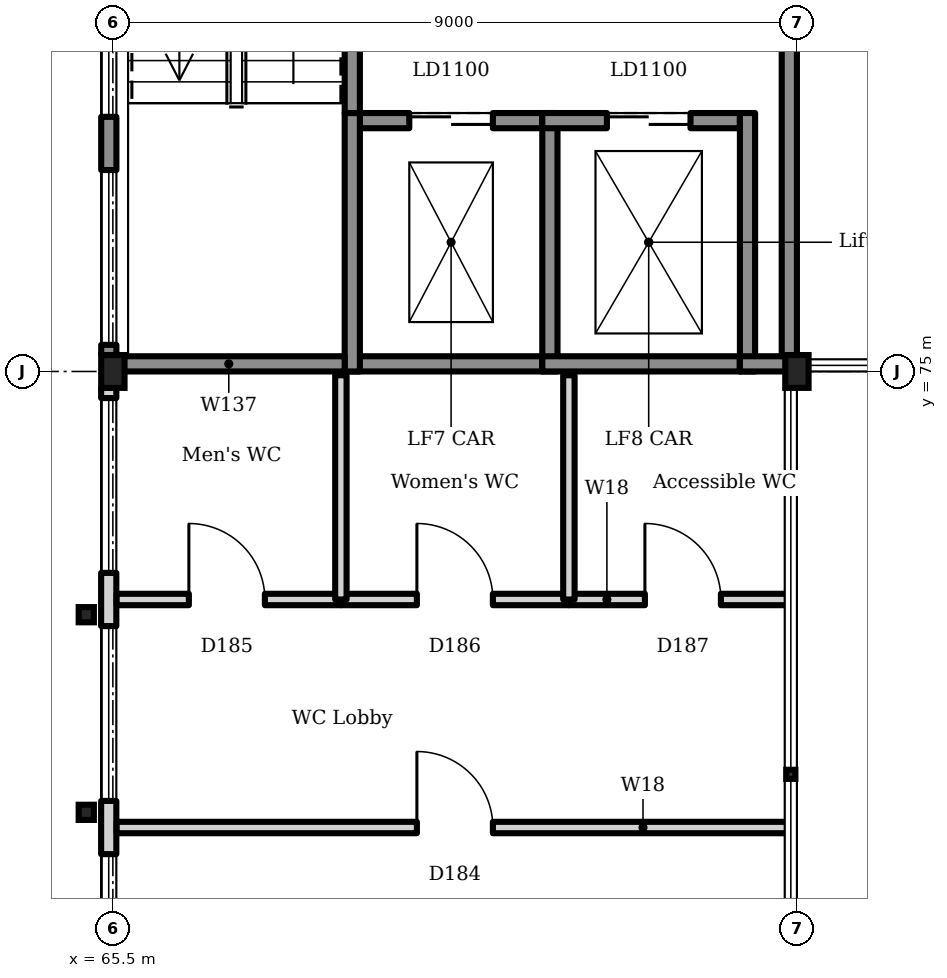
"""IFC4 building model, lengths in metres.
Left out: names, types, materials, properties, quantities, classifications, styles, units other than length and angle.
Written with IfcOpenShell. Run it as: python <this file> out.ifc"""

import sys

from ifc_helpers import new_model, si_unit, direction, frame, frame_2d, origin, origin_2d, place, context, subcontext, project, spatial, rectangle, hollow_rectangle, i_section, extrude, element, fill, save


model = new_model("IFC4")
c1 = context("Model", 3, precision=1e-05, world=origin(), true_north=direction((0.0, 1.0)))
c2 = subcontext(c1, "Body", "Model", "MODEL_VIEW")
j1 = project(units=[si_unit("LENGTHUNIT", "METRE"), si_unit("PLANEANGLEUNIT", "RADIAN")], contexts=[c1])
p1 = place(None, origin())
s1 = spatial("IfcSite", under=j1, at=p1, CompositionType="ELEMENT")
p2 = place(p1, origin())
s2 = spatial("IfcBuilding", under=s1, at=p2, CompositionType="ELEMENT")
p3 = place(p2, origin())
s3 = spatial("IfcBuildingStorey", under=s2, at=p3, CompositionType="ELEMENT", Elevation=0.0)
p4 = place(p3, frame((68.75, 78.3, -1.1), z_axis=(0.0, 0.0, 1.0), x_axis=(1.0, 0.0, 0.0)))
e1 = element("IfcWall", 1, at=p4, inside=s3, PredefinedType="SOLIDWALL", context=c2, shape_type="SweptSolid", body=[
    extrude(rectangle(XDim=2.4, YDim=0.2, at=frame_2d((1.2, 0.0))), origin(), (0.0, 0.0, 1.0), 6.5),
])
p5 = place(p4, frame((0.65, 0.0, 1.1)))
e2 = element("IfcOpeningElement", 2, at=p5, cuts=e1, PredefinedType="OPENING", context=c2, shape_type="SweptSolid", body=[
    extrude(rectangle(XDim=1.1, YDim=2.1, at=frame_2d((0.55, 1.05))), frame((0.0, 0.11, 0.0), z_axis=(0.0, -1.0, 0.0), x_axis=(1.0, 0.0, 0.0)), (0.0, 0.0, 1.0), 0.22),
])
p6 = place(p3, frame((68.55, 75.1, -1.1), z_axis=(0.0, 0.0, 1.0), x_axis=(1.0, 0.0, 0.0)))
e3 = element("IfcWall", 3, at=p6, inside=s3, PredefinedType="SOLIDWALL", context=c2, shape_type="SweptSolid", body=[
    extrude(rectangle(XDim=2.6, YDim=0.2, at=frame_2d((1.3, 0.0))), origin(), (0.0, 0.0, 1.0), 6.5),
])
for number, where, z_axis, x_axis in (
    (4, (68.65, 75.0, -1.1), (0.0, 0.0, 1.0), (0.0, 1.0, 0.0)),
    (5, (71.25, 75.0, -1.1), (0.0, 0.0, 1.0), (0.0, 1.0, 0.0)),
):
    element("IfcWall", number, at=place(p3, frame(where, z_axis=z_axis, x_axis=x_axis)), inside=s3, PredefinedType="SOLIDWALL", context=c2, shape_type="SweptSolid", body=[
        extrude(rectangle(XDim=3.4, YDim=0.2, at=frame_2d((1.7, 0.0))), origin(), (0.0, 0.0, 1.0), 6.5),
    ])
p7 = place(p3, frame((71.15, 78.3, -1.1), z_axis=(0.0, 0.0, 1.0), x_axis=(1.0, 0.0, 0.0)))
e6 = element("IfcWall", 6, at=p7, inside=s3, PredefinedType="SOLIDWALL", context=c2, shape_type="SweptSolid", body=[
    extrude(rectangle(XDim=2.6, YDim=0.2, at=frame_2d((1.3, 0.0))), origin(), (0.0, 0.0, 1.0), 6.5),
])
p8 = place(p7, frame((0.85, 0.0, 1.1)))
e7 = element("IfcOpeningElement", 7, at=p8, cuts=e6, PredefinedType="OPENING", context=c2, shape_type="SweptSolid", body=[
    extrude(rectangle(XDim=1.1, YDim=2.1, at=frame_2d((0.55, 1.05))), frame((0.0, 0.11, 0.0), z_axis=(0.0, -1.0, 0.0), x_axis=(1.0, 0.0, 0.0)), (0.0, 0.0, 1.0), 0.22),
])
p9 = place(p3, frame((71.15, 75.1, -1.1), z_axis=(0.0, 0.0, 1.0), x_axis=(1.0, 0.0, 0.0)))
e8 = element("IfcWall", 8, at=p9, inside=s3, PredefinedType="SOLIDWALL", context=c2, shape_type="SweptSolid", body=[
    extrude(rectangle(XDim=2.6, YDim=0.2, at=frame_2d((1.3, 0.0))), origin(), (0.0, 0.0, 1.0), 6.5),
])
p10 = place(p3, frame((73.85, 75.0, -1.1), z_axis=(0.0, 0.0, 1.0), x_axis=(0.0, 1.0, 0.0)))
e9 = element("IfcWall", 9, at=p10, inside=s3, PredefinedType="SOLIDWALL", context=c2, shape_type="SweptSolid", body=[
    extrude(rectangle(XDim=3.4, YDim=0.2, at=frame_2d((1.7, 0.0))), origin(), (0.0, 0.0, 1.0), 6.5),
])
for number, where, z_axis, x_axis in (
    (10, (65.5, 75.0, 0.0), (0.0, 0.0, 1.0), (1.0, 0.0, 0.0)),
    (11, (74.5, 75.0, 0.0), (0.0, 0.0, 1.0), (1.0, 0.0, 0.0)),
):
    element("IfcColumn", number, at=place(p3, frame(where, z_axis=z_axis, x_axis=x_axis)), inside=s3, PredefinedType="COLUMN", context=c2, shape_type="SweptSolid", body=[
        extrude(i_section(OverallWidth=0.307, OverallDepth=0.432, WebThickness=0.021, FlangeThickness=0.04, FilletRadius=0.027, at=origin_2d()), origin(), (0.0, 0.0, 1.0), 5.4),
    ])
p11 = place(p3, frame((65.446, 66.188, 0.0), z_axis=(0.0, 0.0, 1.0), x_axis=(0.0, 1.0, 0.0)))
e12 = element("IfcWall", 12, at=p11, inside=s3, PredefinedType="SOLIDWALL", context=c2, shape_type="SweptSolid", body=[
    extrude(rectangle(XDim=8.595, YDim=0.2, at=frame_2d((4.298, 0.0))), origin(), (0.0, 0.0, 1.0), 4.65),
])
p12 = place(p11, frame((0.162, 0.0, 0.9)))
e13 = element("IfcOpeningElement", 13, at=p12, cuts=e12, PredefinedType="OPENING", context=c2, shape_type="SweptSolid", body=[
    extrude(rectangle(XDim=2.3, YDim=3.6, at=frame_2d((1.15, 1.8))), frame((0.0, 0.11, 0.0), z_axis=(0.0, -1.0, 0.0), x_axis=(1.0, 0.0, 0.0)), (0.0, 0.0, 1.0), 0.22),
])
p13 = place(p11, frame((3.162, 0.0, 0.9)))
e14 = element("IfcOpeningElement", 14, at=p13, cuts=e12, PredefinedType="OPENING", context=c2, shape_type="SweptSolid", body=[
    extrude(rectangle(XDim=2.3, YDim=3.6, at=frame_2d((1.15, 1.8))), frame((0.0, 0.11, 0.0), z_axis=(0.0, -1.0, 0.0), x_axis=(1.0, 0.0, 0.0)), (0.0, 0.0, 1.0), 0.22),
])
p14 = place(p11, frame((6.162, 0.0, 0.9)))
e15 = element("IfcOpeningElement", 15, at=p14, cuts=e12, PredefinedType="OPENING", context=c2, shape_type="SweptSolid", body=[
    extrude(rectangle(XDim=2.3, YDim=3.6, at=frame_2d((1.15, 1.8))), frame((0.0, 0.11, 0.0), z_axis=(0.0, -1.0, 0.0), x_axis=(1.0, 0.0, 0.0)), (0.0, 0.0, 1.0), 0.22),
])
p15 = place(p3, frame((65.447, 75.216, 0.0), z_axis=(0.0, 0.0, 1.0), x_axis=(0.0, 1.0, 0.0)))
e16 = element("IfcWall", 16, at=p15, inside=s3, PredefinedType="SOLIDWALL", context=c2, shape_type="SweptSolid", body=[
    extrude(rectangle(XDim=8.418, YDim=0.2, at=frame_2d((4.209, 0.0))), origin(), (0.0, 0.0, 1.0), 5.2),
])
p16 = place(p15, frame((7.184, 0.0, 0.0)))
e17 = element("IfcOpeningElement", 17, at=p16, cuts=e16, PredefinedType="OPENING", context=c2, shape_type="SweptSolid", body=[
    extrude(rectangle(XDim=1.0, YDim=2.1, at=frame_2d((0.5, 1.05))), frame((0.0, 0.11, 0.0), z_axis=(0.0, -1.0, 0.0), x_axis=(1.0, 0.0, 0.0)), (0.0, 0.0, 1.0), 0.22),
])
p17 = place(p15, frame((0.134, 0.0, 0.9)))
e18 = element("IfcOpeningElement", 18, at=p17, cuts=e16, PredefinedType="OPENING", context=c2, shape_type="SweptSolid", body=[
    extrude(rectangle(XDim=2.3, YDim=3.6, at=frame_2d((1.15, 1.8))), frame((0.0, 0.11, 0.0), z_axis=(0.0, -1.0, 0.0), x_axis=(1.0, 0.0, 0.0)), (0.0, 0.0, 1.0), 0.22),
])
p18 = place(p15, frame((3.134, 0.0, 0.9)))
e19 = element("IfcOpeningElement", 19, at=p18, cuts=e16, PredefinedType="OPENING", context=c2, shape_type="SweptSolid", body=[
    extrude(rectangle(XDim=2.3, YDim=3.6, at=frame_2d((1.15, 1.8))), frame((0.0, 0.11, 0.0), z_axis=(0.0, -1.0, 0.0), x_axis=(1.0, 0.0, 0.0)), (0.0, 0.0, 1.0), 0.22),
])
p19 = place(p3, frame((65.5, 75.1, 0.0), z_axis=(0.0, 0.0, 1.0), x_axis=(1.0, 0.0, 0.0)))
e20 = element("IfcWall", 20, at=p19, inside=s3, PredefinedType="SHEAR", context=c2, shape_type="SweptSolid", body=[
    extrude(rectangle(XDim=3.05, YDim=0.2, at=frame_2d((1.525, 0.0))), origin(), (0.0, 0.0, 1.0), 5.2),
])
p20 = place(p3, frame((73.75, 75.1, 0.0), z_axis=(0.0, 0.0, 1.0), x_axis=(1.0, 0.0, 0.0)))
e21 = element("IfcWall", 21, at=p20, inside=s3, PredefinedType="SHEAR", context=c2, shape_type="SweptSolid", body=[
    extrude(rectangle(XDim=0.75, YDim=0.2, at=frame_2d((0.375, 0.0))), origin(), (0.0, 0.0, 1.0), 4.65),
])
p21 = place(p3, frame((74.4, 75.2, 0.0), z_axis=(0.0, 0.0, 1.0), x_axis=(0.0, 1.0, 0.0)))
e22 = element("IfcWall", 22, at=p21, inside=s3, PredefinedType="SHEAR", context=c2, shape_type="SweptSolid", body=[
    extrude(rectangle(XDim=8.6, YDim=0.2, at=frame_2d((4.3, 0.0))), origin(), (0.0, 0.0, 1.0), 4.65),
])
p22 = place(p21, frame((4.9, 0.0, 0.0)))
e23 = element("IfcOpeningElement", 23, at=p22, cuts=e22, PredefinedType="OPENING", context=c2, shape_type="SweptSolid", body=[
    extrude(rectangle(XDim=1.8, YDim=2.1, at=frame_2d((0.9, 1.05))), frame((0.0, 0.11, 0.0), z_axis=(0.0, -1.0, 0.0), x_axis=(1.0, 0.0, 0.0)), (0.0, 0.0, 1.0), 0.22),
])
p23 = place(p3, frame((68.65, 78.4, 0.0), z_axis=(0.0, 0.0, 1.0), x_axis=(0.0, 1.0, 0.0)))
e24 = element("IfcWall", 24, at=p23, inside=s3, PredefinedType="SHEAR", context=c2, shape_type="SweptSolid", body=[
    extrude(rectangle(XDim=5.4, YDim=0.2, at=frame_2d((2.7, 0.0))), origin(), (0.0, 0.0, 1.0), 5.2),
])
p24 = place(p23, frame((4.1, 0.0, 0.0)))
e25 = element("IfcOpeningElement", 25, at=p24, cuts=e24, PredefinedType="OPENING", context=c2, shape_type="SweptSolid", body=[
    extrude(rectangle(XDim=1.0, YDim=2.1, at=frame_2d((0.5, 1.05))), frame((0.0, 0.11, 0.0), z_axis=(0.0, -1.0, 0.0), x_axis=(1.0, 0.0, 0.0)), (0.0, 0.0, 1.0), 0.22),
])
p25 = place(p3, frame((65.55, 69.0, 0.0), z_axis=(0.0, 0.0, 1.0), x_axis=(1.0, 0.0, 0.0)))
e26 = element("IfcWall", 26, at=p25, inside=s3, PredefinedType="PARTITIONING", context=c2, shape_type="SweptSolid", body=[
    extrude(rectangle(XDim=8.9, YDim=0.15, at=frame_2d((4.45, 0.0))), origin(), (0.0, 0.0, 1.0), 4.6),
])
p26 = place(p25, frame((3.95, 0.0, 0.0)))
e27 = element("IfcOpeningElement", 27, at=p26, cuts=e26, PredefinedType="OPENING", context=c2, shape_type="SweptSolid", body=[
    extrude(rectangle(XDim=1.0, YDim=2.1, at=frame_2d((0.5, 1.05))), frame((0.0, 0.085, 0.0), z_axis=(0.0, -1.0, 0.0), x_axis=(1.0, 0.0, 0.0)), (0.0, 0.0, 1.0), 0.17),
])
p27 = place(p3, frame((71.5, 72.0, 0.0), z_axis=(0.0, 0.0, 1.0), x_axis=(1.0, 0.0, 0.0)))
e28 = element("IfcWall", 28, at=p27, inside=s3, PredefinedType="PARTITIONING", context=c2, shape_type="SweptSolid", body=[
    extrude(rectangle(XDim=2.95, YDim=0.15, at=frame_2d((1.475, 0.0))), origin(), (0.0, 0.0, 1.0), 4.6),
])
p28 = place(p27, frame((1.0, 0.0, 0.0)))
e29 = element("IfcOpeningElement", 29, at=p28, cuts=e28, PredefinedType="OPENING", context=c2, shape_type="SweptSolid", body=[
    extrude(rectangle(XDim=1.0, YDim=2.1, at=frame_2d((0.5, 1.05))), frame((0.0, 0.085, 0.0), z_axis=(0.0, -1.0, 0.0), x_axis=(1.0, 0.0, 0.0)), (0.0, 0.0, 1.0), 0.17),
])
p29 = place(p3, frame((68.5, 72.0, 0.0), z_axis=(0.0, 0.0, 1.0), x_axis=(1.0, 0.0, 0.0)))
e30 = element("IfcWall", 30, at=p29, inside=s3, PredefinedType="PARTITIONING", context=c2, shape_type="SweptSolid", body=[
    extrude(rectangle(XDim=3.0, YDim=0.15, at=frame_2d((1.5, 0.0))), origin(), (0.0, 0.0, 1.0), 4.6),
])
p30 = place(p29, frame((1.0, 0.0, 0.0)))
e31 = element("IfcOpeningElement", 31, at=p30, cuts=e30, PredefinedType="OPENING", context=c2, shape_type="SweptSolid", body=[
    extrude(rectangle(XDim=1.0, YDim=2.1, at=frame_2d((0.5, 1.05))), frame((0.0, 0.085, 0.0), z_axis=(0.0, -1.0, 0.0), x_axis=(1.0, 0.0, 0.0)), (0.0, 0.0, 1.0), 0.17),
])
p31 = place(p3, frame((65.55, 72.0, 0.0), z_axis=(0.0, 0.0, 1.0), x_axis=(1.0, 0.0, 0.0)))
e32 = element("IfcWall", 32, at=p31, inside=s3, PredefinedType="PARTITIONING", context=c2, shape_type="SweptSolid", body=[
    extrude(rectangle(XDim=2.95, YDim=0.15, at=frame_2d((1.475, 0.0))), origin(), (0.0, 0.0, 1.0), 4.6),
])
p32 = place(p31, frame((0.95, 0.0, 0.0)))
e33 = element("IfcOpeningElement", 33, at=p32, cuts=e32, PredefinedType="OPENING", context=c2, shape_type="SweptSolid", body=[
    extrude(rectangle(XDim=1.0, YDim=2.1, at=frame_2d((0.5, 1.05))), frame((0.0, 0.085, 0.0), z_axis=(0.0, -1.0, 0.0), x_axis=(1.0, 0.0, 0.0)), (0.0, 0.0, 1.0), 0.17),
])
for number, where, z_axis, x_axis in (
    (34, (68.5, 72.0, 0.0), (0.0, 0.0, 1.0), (0.0, 1.0, 0.0)),
    (35, (71.5, 72.0, 0.0), (0.0, 0.0, 1.0), (0.0, 1.0, 0.0)),
):
    element("IfcWall", number, at=place(p3, frame(where, z_axis=z_axis, x_axis=x_axis)), inside=s3, PredefinedType="PARTITIONING", context=c2, shape_type="SweptSolid", body=[
        extrude(rectangle(XDim=2.95, YDim=0.15, at=frame_2d((1.475, 0.0))), origin(), (0.0, 0.0, 1.0), 4.6),
    ])
for number, where, z_axis, x_axis in (
    (36, (65.15, 69.2, 0.0), (0.0, 0.0, 1.0), (1.0, 0.0, 0.0)),
    (37, (65.15, 71.8, 0.0), (0.0, 0.0, 1.0), (1.0, 0.0, 0.0)),
):
    element("IfcColumn", number, at=place(p3, frame(where, z_axis=z_axis, x_axis=x_axis)), inside=s3, PredefinedType="COLUMN", context=c2, shape_type="SweptSolid", body=[
        extrude(hollow_rectangle(XDim=0.2, YDim=0.2, WallThickness=0.01, InnerFilletRadius=0.01, OuterFilletRadius=0.015, at=origin_2d()), origin(), (0.0, 0.0, 1.0), 5.4),
    ])
p33 = place(p5, origin())
e38 = element("IfcDoor", 38, at=p33, inside=s3, OperationType="SLIDING_TO_LEFT", PredefinedType="DOOR", context=c2, shape_type="SweptSolid", body=[
    extrude(rectangle(XDim=1.1, YDim=2.1, at=frame_2d((0.55, 1.05))), frame((0.0, 0.025, 0.0), z_axis=(0.0, -1.0, 0.0), x_axis=(1.0, 0.0, 0.0)), (0.0, 0.0, 1.0), 0.05),
])
fill(e2, e38)
p34 = place(p8, origin())
e39 = element("IfcDoor", 39, at=p34, inside=s3, OperationType="SLIDING_TO_LEFT", PredefinedType="DOOR", context=c2, shape_type="SweptSolid", body=[
    extrude(rectangle(XDim=1.1, YDim=2.1, at=frame_2d((0.55, 1.05))), frame((0.0, 0.025, 0.0), z_axis=(0.0, -1.0, 0.0), x_axis=(1.0, 0.0, 0.0)), (0.0, 0.0, 1.0), 0.05),
])
fill(e7, e39)
p35 = place(p12, origin())
e40 = element("IfcWindow", 40, at=p35, inside=s3, PartitioningType="SINGLE_PANEL", PredefinedType="WINDOW", context=c2, shape_type="SweptSolid", body=[
    extrude(rectangle(XDim=2.3, YDim=3.6, at=frame_2d((1.15, 1.8))), frame((0.0, 0.03, 0.0), z_axis=(0.0, -1.0, 0.0), x_axis=(1.0, 0.0, 0.0)), (0.0, 0.0, 1.0), 0.06),
])
fill(e13, e40)
p36 = place(p13, origin())
e41 = element("IfcWindow", 41, at=p36, inside=s3, PartitioningType="SINGLE_PANEL", PredefinedType="WINDOW", context=c2, shape_type="SweptSolid", body=[
    extrude(rectangle(XDim=2.3, YDim=3.6, at=frame_2d((1.15, 1.8))), frame((0.0, 0.03, 0.0), z_axis=(0.0, -1.0, 0.0), x_axis=(1.0, 0.0, 0.0)), (0.0, 0.0, 1.0), 0.06),
])
fill(e14, e41)
p37 = place(p14, origin())
e42 = element("IfcWindow", 42, at=p37, inside=s3, PartitioningType="SINGLE_PANEL", PredefinedType="WINDOW", context=c2, shape_type="SweptSolid", body=[
    extrude(rectangle(XDim=2.3, YDim=3.6, at=frame_2d((1.15, 1.8))), frame((0.0, 0.03, 0.0), z_axis=(0.0, -1.0, 0.0), x_axis=(1.0, 0.0, 0.0)), (0.0, 0.0, 1.0), 0.06),
])
fill(e15, e42)
p38 = place(p17, origin())
e43 = element("IfcWindow", 43, at=p38, inside=s3, PartitioningType="SINGLE_PANEL", PredefinedType="WINDOW", context=c2, shape_type="SweptSolid", body=[
    extrude(rectangle(XDim=2.3, YDim=3.6, at=frame_2d((1.15, 1.8))), frame((0.0, 0.03, 0.0), z_axis=(0.0, -1.0, 0.0), x_axis=(1.0, 0.0, 0.0)), (0.0, 0.0, 1.0), 0.06),
])
fill(e18, e43)
p39 = place(p18, origin())
e44 = element("IfcWindow", 44, at=p39, inside=s3, PartitioningType="SINGLE_PANEL", PredefinedType="WINDOW", context=c2, shape_type="SweptSolid", body=[
    extrude(rectangle(XDim=2.3, YDim=3.6, at=frame_2d((1.15, 1.8))), frame((0.0, 0.03, 0.0), z_axis=(0.0, -1.0, 0.0), x_axis=(1.0, 0.0, 0.0)), (0.0, 0.0, 1.0), 0.06),
])
fill(e19, e44)
p40 = place(p26, origin())
e45 = element("IfcDoor", 45, at=p40, inside=s3, OperationType="SINGLE_SWING_RIGHT", PredefinedType="DOOR", context=c2, shape_type="SweptSolid", body=[
    extrude(rectangle(XDim=1.0, YDim=2.1, at=frame_2d((0.5, 1.05))), frame((0.0, 0.025, 0.0), z_axis=(0.0, -1.0, 0.0), x_axis=(1.0, 0.0, 0.0)), (0.0, 0.0, 1.0), 0.05),
])
fill(e27, e45)
p41 = place(p32, origin())
e46 = element("IfcDoor", 46, at=p41, inside=s3, OperationType="SINGLE_SWING_RIGHT", PredefinedType="DOOR", context=c2, shape_type="SweptSolid", body=[
    extrude(rectangle(XDim=1.0, YDim=2.1, at=frame_2d((0.5, 1.05))), frame((0.0, 0.025, 0.0), z_axis=(0.0, -1.0, 0.0), x_axis=(1.0, 0.0, 0.0)), (0.0, 0.0, 1.0), 0.05),
])
fill(e33, e46)
p42 = place(p30, origin())
e47 = element("IfcDoor", 47, at=p42, inside=s3, OperationType="SINGLE_SWING_RIGHT", PredefinedType="DOOR", context=c2, shape_type="SweptSolid", body=[
    extrude(rectangle(XDim=1.0, YDim=2.1, at=frame_2d((0.5, 1.05))), frame((0.0, 0.025, 0.0), z_axis=(0.0, -1.0, 0.0), x_axis=(1.0, 0.0, 0.0)), (0.0, 0.0, 1.0), 0.05),
])
fill(e31, e47)
p43 = place(p28, origin())
e48 = element("IfcDoor", 48, at=p43, inside=s3, OperationType="SINGLE_SWING_RIGHT", PredefinedType="DOOR", context=c2, shape_type="SweptSolid", body=[
    extrude(rectangle(XDim=1.0, YDim=2.1, at=frame_2d((0.5, 1.05))), frame((0.0, 0.025, 0.0), z_axis=(0.0, -1.0, 0.0), x_axis=(1.0, 0.0, 0.0)), (0.0, 0.0, 1.0), 0.05),
])
fill(e29, e48)
save(model, sys.argv[1])
